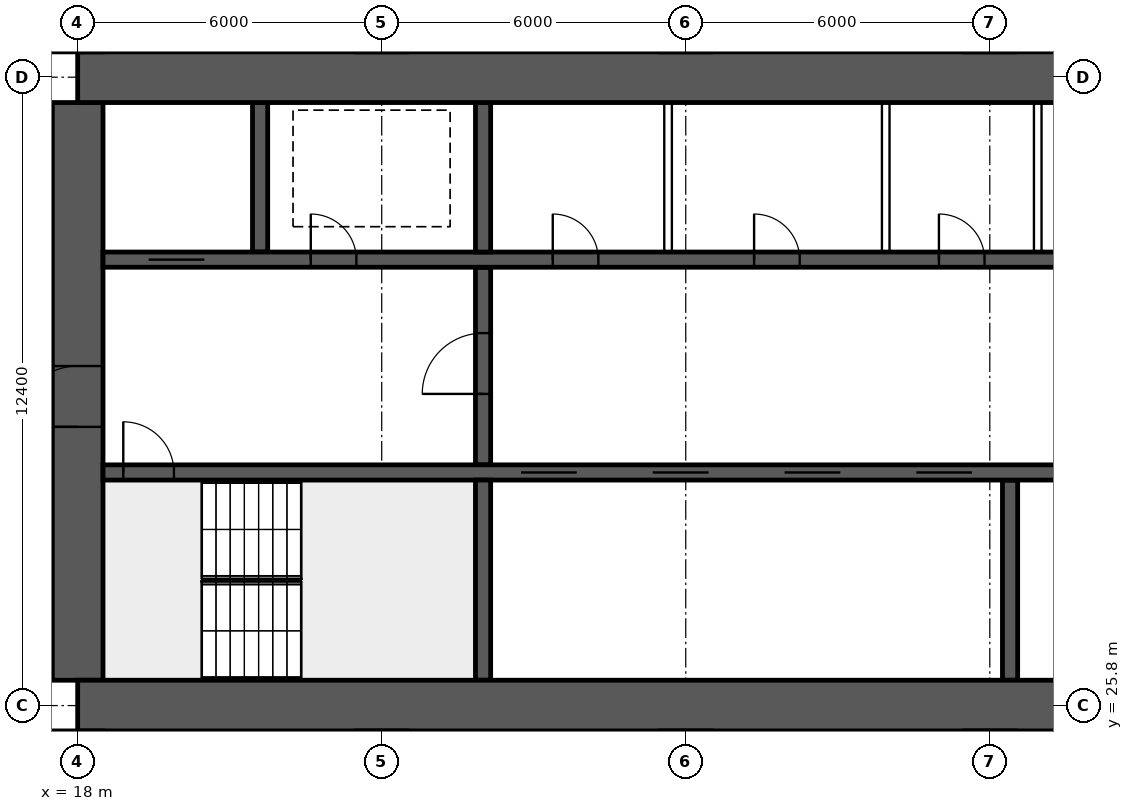
"""IFC4 building model, lengths in metres.
Left out: names, types, materials, properties, quantities, classifications, styles, units other than length and angle.
Written with IfcOpenShell. Run it as: python <this file> out.ifc"""

import sys

from ifc_helpers import new_model, si_unit, direction, frame, frame_2d, origin, place, context, subcontext, project, spatial, rectangle, extrude, element, fill, save


model = new_model("IFC4")
c1 = context("Model", 3, precision=1e-05, world=origin(), true_north=direction((0.0, 1.0)))
c2 = subcontext(c1, "Body", "Model", "MODEL_VIEW")
j1 = project(units=[si_unit("LENGTHUNIT", "METRE"), si_unit("PLANEANGLEUNIT", "RADIAN")], contexts=[c1])
p1 = place(None, origin())
s1 = spatial("IfcSite", under=j1, at=p1, CompositionType="ELEMENT")
p2 = place(p1, origin())
s2 = spatial("IfcBuilding", under=s1, at=p2, CompositionType="ELEMENT")
p3 = place(p2, frame((0.0, 0.0, 11.0)))
s3 = spatial("IfcBuildingStorey", under=s2, at=p3, CompositionType="ELEMENT", Elevation=11.0)
for number, where, z_axis, x_axis in (
    (1, (18.0, 25.8, 0.0), (0.0, 0.0, 1.0), (1.0, 0.0, 0.0)),
    (2, (18.0, 38.2, 0.0), (0.0, 0.0, 1.0), (1.0, 0.0, 0.0)),
):
    element("IfcWall", number, at=place(p3, frame(where, z_axis=z_axis, x_axis=x_axis)), inside=s3, PredefinedType="SHEAR", context=c2, shape_type="SweptSolid", body=[
        extrude(rectangle(XDim=48.0, YDim=1.0, at=frame_2d((24.0, 0.0))), origin(), (0.0, 0.0, 1.0), 5.0),
    ])
p4 = place(p3, frame((18.0, 26.3, 0.0), z_axis=(0.0, 0.0, 1.0), x_axis=(0.0, 1.0, 0.0)))
e3 = element("IfcWall", 3, at=p4, inside=s3, PredefinedType="SHEAR", context=c2, shape_type="SweptSolid", body=[
    extrude(rectangle(XDim=11.4, YDim=1.0, at=frame_2d((5.7, 0.0))), origin(), (0.0, 0.0, 1.0), 5.0),
])
p5 = place(p4, frame((5.0, 0.0, 0.0)))
e4 = element("IfcOpeningElement", 4, at=p5, cuts=e3, PredefinedType="OPENING", context=c2, shape_type="SweptSolid", body=[
    extrude(rectangle(XDim=1.2, YDim=2.1, at=frame_2d((0.6, 1.05))), frame((0.0, 0.51, 0.0), z_axis=(0.0, -1.0, 0.0), x_axis=(1.0, 0.0, 0.0)), (0.0, 0.0, 1.0), 1.02),
])
p6 = place(p3, frame((18.5, 30.4, 0.0), z_axis=(0.0, 0.0, 1.0), x_axis=(1.0, 0.0, 0.0)))
e5 = element("IfcWall", 5, at=p6, inside=s3, PredefinedType="SHEAR", context=c2, shape_type="SweptSolid", body=[
    extrude(rectangle(XDim=47.0, YDim=0.3, at=frame_2d((23.5, 0.0))), origin(), (0.0, 0.0, 1.0), 5.0),
])
p7 = place(p6, frame((0.4, 0.0, 0.0)))
e6 = element("IfcOpeningElement", 6, at=p7, cuts=e5, PredefinedType="OPENING", context=c2, shape_type="SweptSolid", body=[
    extrude(rectangle(XDim=1.0, YDim=2.1, at=frame_2d((0.5, 1.05))), frame((0.0, 0.16, 0.0), z_axis=(0.0, -1.0, 0.0), x_axis=(1.0, 0.0, 0.0)), (0.0, 0.0, 1.0), 0.32),
])
p8 = place(p6, frame((45.6, 0.0, 0.0)))
e7 = element("IfcOpeningElement", 7, at=p8, cuts=e5, PredefinedType="OPENING", context=c2, shape_type="SweptSolid", body=[
    extrude(rectangle(XDim=1.0, YDim=2.1, at=frame_2d((0.5, 1.05))), frame((0.0, 0.16, 0.0), z_axis=(0.0, -1.0, 0.0), x_axis=(1.0, 0.0, 0.0)), (0.0, 0.0, 1.0), 0.32),
])
p9 = place(p6, frame((8.25, 0.0, 0.0)))
e8 = element("IfcOpeningElement", 8, at=p9, cuts=e5, PredefinedType="OPENING", context=c2, shape_type="SweptSolid", body=[
    extrude(rectangle(XDim=1.1, YDim=2.1, at=frame_2d((0.55, 1.05))), frame((0.0, 0.16, 0.0), z_axis=(0.0, -1.0, 0.0), x_axis=(1.0, 0.0, 0.0)), (0.0, 0.0, 1.0), 0.32),
])
p10 = place(p6, frame((10.85, 0.0, 0.0)))
e9 = element("IfcOpeningElement", 9, at=p10, cuts=e5, PredefinedType="OPENING", context=c2, shape_type="SweptSolid", body=[
    extrude(rectangle(XDim=1.1, YDim=2.1, at=frame_2d((0.55, 1.05))), frame((0.0, 0.16, 0.0), z_axis=(0.0, -1.0, 0.0), x_axis=(1.0, 0.0, 0.0)), (0.0, 0.0, 1.0), 0.32),
])
p11 = place(p6, frame((13.45, 0.0, 0.0)))
e10 = element("IfcOpeningElement", 10, at=p11, cuts=e5, PredefinedType="OPENING", context=c2, shape_type="SweptSolid", body=[
    extrude(rectangle(XDim=1.1, YDim=2.1, at=frame_2d((0.55, 1.05))), frame((0.0, 0.16, 0.0), z_axis=(0.0, -1.0, 0.0), x_axis=(1.0, 0.0, 0.0)), (0.0, 0.0, 1.0), 0.32),
])
p12 = place(p6, frame((16.05, 0.0, 0.0)))
e11 = element("IfcOpeningElement", 11, at=p12, cuts=e5, PredefinedType="OPENING", context=c2, shape_type="SweptSolid", body=[
    extrude(rectangle(XDim=1.1, YDim=2.1, at=frame_2d((0.55, 1.05))), frame((0.0, 0.16, 0.0), z_axis=(0.0, -1.0, 0.0), x_axis=(1.0, 0.0, 0.0)), (0.0, 0.0, 1.0), 0.32),
])
p13 = place(p6, frame((30.117, 0.0, 0.0)))
e12 = element("IfcOpeningElement", 12, at=p13, cuts=e5, PredefinedType="OPENING", context=c2, shape_type="SweptSolid", body=[
    extrude(rectangle(XDim=1.1, YDim=2.1, at=frame_2d((0.55, 1.05))), frame((0.0, 0.16, 0.0), z_axis=(0.0, -1.0, 0.0), x_axis=(1.0, 0.0, 0.0)), (0.0, 0.0, 1.0), 0.32),
])
p14 = place(p6, frame((33.65, 0.0, 0.0)))
e13 = element("IfcOpeningElement", 13, at=p14, cuts=e5, PredefinedType="OPENING", context=c2, shape_type="SweptSolid", body=[
    extrude(rectangle(XDim=1.1, YDim=2.1, at=frame_2d((0.55, 1.05))), frame((0.0, 0.16, 0.0), z_axis=(0.0, -1.0, 0.0), x_axis=(1.0, 0.0, 0.0)), (0.0, 0.0, 1.0), 0.32),
])
p15 = place(p6, frame((37.183, 0.0, 0.0)))
e14 = element("IfcOpeningElement", 14, at=p15, cuts=e5, PredefinedType="OPENING", context=c2, shape_type="SweptSolid", body=[
    extrude(rectangle(XDim=1.1, YDim=2.1, at=frame_2d((0.55, 1.05))), frame((0.0, 0.16, 0.0), z_axis=(0.0, -1.0, 0.0), x_axis=(1.0, 0.0, 0.0)), (0.0, 0.0, 1.0), 0.32),
])
p16 = place(p3, frame((18.5, 34.6, 0.0), z_axis=(0.0, 0.0, 1.0), x_axis=(1.0, 0.0, 0.0)))
e15 = element("IfcWall", 15, at=p16, inside=s3, PredefinedType="SHEAR", context=c2, shape_type="SweptSolid", body=[
    extrude(rectangle(XDim=47.0, YDim=0.3, at=frame_2d((23.5, 0.0))), origin(), (0.0, 0.0, 1.0), 5.0),
])
p17 = place(p16, frame((0.9, 0.0, 0.0)))
e16 = element("IfcOpeningElement", 16, at=p17, cuts=e15, PredefinedType="OPENING", context=c2, shape_type="SweptSolid", body=[
    extrude(rectangle(XDim=1.1, YDim=2.1, at=frame_2d((0.55, 1.05))), frame((0.0, 0.16, 0.0), z_axis=(0.0, -1.0, 0.0), x_axis=(1.0, 0.0, 0.0)), (0.0, 0.0, 1.0), 0.32),
])
p18 = place(p16, frame((45.0, 0.0, 0.0)))
e17 = element("IfcOpeningElement", 17, at=p18, cuts=e15, PredefinedType="OPENING", context=c2, shape_type="SweptSolid", body=[
    extrude(rectangle(XDim=1.1, YDim=2.1, at=frame_2d((0.55, 1.05))), frame((0.0, 0.16, 0.0), z_axis=(0.0, -1.0, 0.0), x_axis=(1.0, 0.0, 0.0)), (0.0, 0.0, 1.0), 0.32),
])
p19 = place(p16, frame((4.1, 0.0, 0.0)))
e18 = element("IfcOpeningElement", 18, at=p19, cuts=e15, PredefinedType="OPENING", context=c2, shape_type="SweptSolid", body=[
    extrude(rectangle(XDim=0.9, YDim=2.1, at=frame_2d((0.45, 1.05))), frame((0.0, 0.16, 0.0), z_axis=(0.0, -1.0, 0.0), x_axis=(1.0, 0.0, 0.0)), (0.0, 0.0, 1.0), 0.32),
])
p20 = place(p16, frame((42.0, 0.0, 0.0)))
e19 = element("IfcOpeningElement", 19, at=p20, cuts=e15, PredefinedType="OPENING", context=c2, shape_type="SweptSolid", body=[
    extrude(rectangle(XDim=0.9, YDim=2.1, at=frame_2d((0.45, 1.05))), frame((0.0, 0.16, 0.0), z_axis=(0.0, -1.0, 0.0), x_axis=(1.0, 0.0, 0.0)), (0.0, 0.0, 1.0), 0.32),
])
p21 = place(p16, frame((8.875, 0.0, 0.0)))
e20 = element("IfcOpeningElement", 20, at=p21, cuts=e15, PredefinedType="OPENING", context=c2, shape_type="SweptSolid", body=[
    extrude(rectangle(XDim=0.9, YDim=2.1, at=frame_2d((0.45, 1.05))), frame((0.0, 0.16, 0.0), z_axis=(0.0, -1.0, 0.0), x_axis=(1.0, 0.0, 0.0)), (0.0, 0.0, 1.0), 0.32),
])
p22 = place(p16, frame((12.849, 0.0, 0.0)))
e21 = element("IfcOpeningElement", 21, at=p22, cuts=e15, PredefinedType="OPENING", context=c2, shape_type="SweptSolid", body=[
    extrude(rectangle(XDim=0.9, YDim=2.1, at=frame_2d((0.45, 1.05))), frame((0.0, 0.16, 0.0), z_axis=(0.0, -1.0, 0.0), x_axis=(1.0, 0.0, 0.0)), (0.0, 0.0, 1.0), 0.32),
])
p23 = place(p16, frame((16.496, 0.0, 0.0)))
e22 = element("IfcOpeningElement", 22, at=p23, cuts=e15, PredefinedType="OPENING", context=c2, shape_type="SweptSolid", body=[
    extrude(rectangle(XDim=0.9, YDim=2.1, at=frame_2d((0.45, 1.05))), frame((0.0, 0.16, 0.0), z_axis=(0.0, -1.0, 0.0), x_axis=(1.0, 0.0, 0.0)), (0.0, 0.0, 1.0), 0.32),
])
p24 = place(p16, frame((20.255, 0.0, 0.0)))
e23 = element("IfcOpeningElement", 23, at=p24, cuts=e15, PredefinedType="OPENING", context=c2, shape_type="SweptSolid", body=[
    extrude(rectangle(XDim=0.9, YDim=2.1, at=frame_2d((0.45, 1.05))), frame((0.0, 0.16, 0.0), z_axis=(0.0, -1.0, 0.0), x_axis=(1.0, 0.0, 0.0)), (0.0, 0.0, 1.0), 0.32),
])
p25 = place(p16, frame((24.661, 0.0, 0.0)))
e24 = element("IfcOpeningElement", 24, at=p25, cuts=e15, PredefinedType="OPENING", context=c2, shape_type="SweptSolid", body=[
    extrude(rectangle(XDim=0.9, YDim=2.1, at=frame_2d((0.45, 1.05))), frame((0.0, 0.16, 0.0), z_axis=(0.0, -1.0, 0.0), x_axis=(1.0, 0.0, 0.0)), (0.0, 0.0, 1.0), 0.32),
])
p26 = place(p16, frame((27.458, 0.0, 0.0)))
e25 = element("IfcOpeningElement", 25, at=p26, cuts=e15, PredefinedType="OPENING", context=c2, shape_type="SweptSolid", body=[
    extrude(rectangle(XDim=0.9, YDim=2.1, at=frame_2d((0.45, 1.05))), frame((0.0, 0.16, 0.0), z_axis=(0.0, -1.0, 0.0), x_axis=(1.0, 0.0, 0.0)), (0.0, 0.0, 1.0), 0.32),
])
p27 = place(p16, frame((29.831, 0.0, 0.0)))
e26 = element("IfcOpeningElement", 26, at=p27, cuts=e15, PredefinedType="OPENING", context=c2, shape_type="SweptSolid", body=[
    extrude(rectangle(XDim=0.9, YDim=2.1, at=frame_2d((0.45, 1.05))), frame((0.0, 0.16, 0.0), z_axis=(0.0, -1.0, 0.0), x_axis=(1.0, 0.0, 0.0)), (0.0, 0.0, 1.0), 0.32),
])
p28 = place(p16, frame((35.302, 0.0, 0.0)))
e27 = element("IfcOpeningElement", 27, at=p28, cuts=e15, PredefinedType="OPENING", context=c2, shape_type="SweptSolid", body=[
    extrude(rectangle(XDim=0.9, YDim=2.1, at=frame_2d((0.45, 1.05))), frame((0.0, 0.16, 0.0), z_axis=(0.0, -1.0, 0.0), x_axis=(1.0, 0.0, 0.0)), (0.0, 0.0, 1.0), 0.32),
])
p29 = place(p3, frame((26.0, 26.3, 0.0), z_axis=(0.0, 0.0, 1.0), x_axis=(0.0, 1.0, 0.0)))
e28 = element("IfcWall", 28, at=p29, inside=s3, PredefinedType="SHEAR", context=c2, shape_type="SweptSolid", body=[
    extrude(rectangle(XDim=3.95, YDim=0.3, at=frame_2d((1.975, 0.0))), origin(), (0.0, 0.0, 1.0), 5.0),
])
p30 = place(p3, frame((26.0, 30.55, 0.0), z_axis=(0.0, 0.0, 1.0), x_axis=(0.0, 1.0, 0.0)))
e29 = element("IfcWall", 29, at=p30, inside=s3, PredefinedType="SHEAR", context=c2, shape_type="SweptSolid", body=[
    extrude(rectangle(XDim=3.9, YDim=0.3, at=frame_2d((1.95, 0.0))), origin(), (0.0, 0.0, 1.0), 5.0),
])
p31 = place(p30, frame((1.4, 0.0, 0.0)))
e30 = element("IfcOpeningElement", 30, at=p31, cuts=e29, PredefinedType="OPENING", context=c2, shape_type="SweptSolid", body=[
    extrude(rectangle(XDim=1.2, YDim=2.1, at=frame_2d((0.6, 1.05))), frame((0.0, 0.16, 0.0), z_axis=(0.0, -1.0, 0.0), x_axis=(1.0, 0.0, 0.0)), (0.0, 0.0, 1.0), 0.32),
])
for number, where, z_axis, x_axis in (
    (31, (21.6, 34.75, 0.0), (0.0, 0.0, 1.0), (0.0, 1.0, 0.0)),
    (32, (26.0, 34.75, 0.0), (0.0, 0.0, 1.0), (0.0, 1.0, 0.0)),
):
    element("IfcWall", number, at=place(p3, frame(where, z_axis=z_axis, x_axis=x_axis)), inside=s3, PredefinedType="SHEAR", context=c2, shape_type="SweptSolid", body=[
        extrude(rectangle(XDim=2.95, YDim=0.3, at=frame_2d((1.475, 0.0))), origin(), (0.0, 0.0, 1.0), 5.0),
    ])
p32 = place(p3, frame((36.4, 26.3, 0.0), z_axis=(0.0, 0.0, 1.0), x_axis=(0.0, 1.0, 0.0)))
e33 = element("IfcWall", 33, at=p32, inside=s3, PredefinedType="SHEAR", context=c2, shape_type="SweptSolid", body=[
    extrude(rectangle(XDim=3.95, YDim=0.3, at=frame_2d((1.975, 0.0))), origin(), (0.0, 0.0, 1.0), 5.0),
])
for number, where, z_axis, x_axis in (
    (34, (29.651, 34.75, 0.0), (0.0, 0.0, 1.0), (0.0, 1.0, 0.0)),
    (35, (33.946, 34.75, 0.0), (0.0, 0.0, 1.0), (0.0, 1.0, 0.0)),
    (36, (36.946, 34.75, 0.0), (0.0, 0.0, 1.0), (0.0, 1.0, 0.0)),
):
    element("IfcWall", number, at=place(p3, frame(where, z_axis=z_axis, x_axis=x_axis)), inside=s3, PredefinedType="SOLIDWALL", context=c2, shape_type="SweptSolid", body=[
        extrude(rectangle(XDim=2.95, YDim=0.15, at=frame_2d((1.475, 0.0))), origin(), (0.0, 0.0, 1.0), 4.6),
    ])
p33 = place(p3, frame((21.75, 38.5, 0.0), z_axis=(0.0, 0.0, 1.0), x_axis=(0.0, 1.0, 0.0)))
e37 = element("IfcWall", 37, at=p33, inside=s3, PredefinedType="PARTITIONING", context=c2, shape_type="SweptSolid", body=[
    extrude(rectangle(XDim=10.7, YDim=0.15, at=frame_2d((5.35, 0.0))), origin(), (0.0, 0.0, 1.0), 4.6),
])
p34 = place(p33, frame((8.8, 0.0, 0.0)))
e38 = element("IfcOpeningElement", 38, at=p34, cuts=e37, PredefinedType="OPENING", context=c2, shape_type="SweptSolid", body=[
    extrude(rectangle(XDim=0.9, YDim=2.1, at=frame_2d((0.45, 1.05))), frame((0.0, 0.085, 0.0), z_axis=(0.0, -1.0, 0.0), x_axis=(1.0, 0.0, 0.0)), (0.0, 0.0, 1.0), 0.17),
])
p35 = place(p3, frame((26.325, 38.5, 0.0), z_axis=(0.0, 0.0, 1.0), x_axis=(0.0, 1.0, 0.0)))
e39 = element("IfcWall", 39, at=p35, inside=s3, PredefinedType="PARTITIONING", context=c2, shape_type="SweptSolid", body=[
    extrude(rectangle(XDim=10.7, YDim=0.15, at=frame_2d((5.35, 0.0))), origin(), (0.0, 0.0, 1.0), 4.6),
])
p36 = place(p35, frame((8.8, 0.0, 0.0)))
e40 = element("IfcOpeningElement", 40, at=p36, cuts=e39, PredefinedType="OPENING", context=c2, shape_type="SweptSolid", body=[
    extrude(rectangle(XDim=0.9, YDim=2.1, at=frame_2d((0.45, 1.05))), frame((0.0, 0.085, 0.0), z_axis=(0.0, -1.0, 0.0), x_axis=(1.0, 0.0, 0.0)), (0.0, 0.0, 1.0), 0.17),
])
p37 = place(p3, frame((33.45, 38.5, 0.0), z_axis=(0.0, 0.0, 1.0), x_axis=(0.0, 1.0, 0.0)))
e41 = element("IfcWall", 41, at=p37, inside=s3, PredefinedType="PARTITIONING", context=c2, shape_type="SweptSolid", body=[
    extrude(rectangle(XDim=10.7, YDim=0.15, at=frame_2d((5.35, 0.0))), origin(), (0.0, 0.0, 1.0), 4.6),
])
p38 = place(p37, frame((8.8, 0.0, 0.0)))
e42 = element("IfcOpeningElement", 42, at=p38, cuts=e41, PredefinedType="OPENING", context=c2, shape_type="SweptSolid", body=[
    extrude(rectangle(XDim=0.9, YDim=2.1, at=frame_2d((0.45, 1.05))), frame((0.0, 0.085, 0.0), z_axis=(0.0, -1.0, 0.0), x_axis=(1.0, 0.0, 0.0)), (0.0, 0.0, 1.0), 0.17),
])
p39 = place(p5, origin())
e43 = element("IfcDoor", 43, at=p39, inside=s3, OperationType="SINGLE_SWING_LEFT", PredefinedType="DOOR", context=c2, shape_type="SweptSolid", body=[
    extrude(rectangle(XDim=1.2, YDim=2.1, at=frame_2d((0.6, 1.05))), frame((0.0, 0.025, 0.0), z_axis=(0.0, -1.0, 0.0), x_axis=(1.0, 0.0, 0.0)), (0.0, 0.0, 1.0), 0.05),
])
fill(e4, e43)
p40 = place(p7, origin())
e44 = element("IfcDoor", 44, at=p40, inside=s3, OperationType="SINGLE_SWING_LEFT", PredefinedType="DOOR", context=c2, shape_type="SweptSolid", body=[
    extrude(rectangle(XDim=1.0, YDim=2.1, at=frame_2d((0.5, 1.05))), frame((0.0, 0.025, 0.0), z_axis=(0.0, -1.0, 0.0), x_axis=(1.0, 0.0, 0.0)), (0.0, 0.0, 1.0), 0.05),
])
fill(e6, e44)
p41 = place(p17, origin())
e45 = element("IfcDoor", 45, at=p41, inside=s3, OperationType="DOUBLE_DOOR_SLIDING", PredefinedType="DOOR", context=c2, shape_type="SweptSolid", body=[
    extrude(rectangle(XDim=1.1, YDim=2.1, at=frame_2d((0.55, 1.05))), frame((0.0, 0.025, 0.0), z_axis=(0.0, -1.0, 0.0), x_axis=(1.0, 0.0, 0.0)), (0.0, 0.0, 1.0), 0.05),
])
fill(e16, e45)
p42 = place(p19, origin())
e46 = element("IfcDoor", 46, at=p42, inside=s3, OperationType="SINGLE_SWING_LEFT", PredefinedType="DOOR", context=c2, shape_type="SweptSolid", body=[
    extrude(rectangle(XDim=0.9, YDim=2.1, at=frame_2d((0.45, 1.05))), frame((0.0, 0.025, 0.0), z_axis=(0.0, -1.0, 0.0), x_axis=(1.0, 0.0, 0.0)), (0.0, 0.0, 1.0), 0.05),
])
fill(e18, e46)
p43 = place(p31, origin())
e47 = element("IfcDoor", 47, at=p43, inside=s3, OperationType="SINGLE_SWING_LEFT", PredefinedType="DOOR", context=c2, shape_type="SweptSolid", body=[
    extrude(rectangle(XDim=1.2, YDim=2.1, at=frame_2d((0.6, 1.05))), frame((0.0, 0.025, 0.0), z_axis=(0.0, -1.0, 0.0), x_axis=(1.0, 0.0, 0.0)), (0.0, 0.0, 1.0), 0.05),
])
fill(e30, e47)
p44 = place(p21, origin())
e48 = element("IfcDoor", 48, at=p44, inside=s3, OperationType="SINGLE_SWING_LEFT", PredefinedType="DOOR", context=c2, shape_type="SweptSolid", body=[
    extrude(rectangle(XDim=0.9, YDim=2.1, at=frame_2d((0.45, 1.05))), frame((0.0, 0.025, 0.0), z_axis=(0.0, -1.0, 0.0), x_axis=(1.0, 0.0, 0.0)), (0.0, 0.0, 1.0), 0.05),
])
fill(e20, e48)
p45 = place(p22, origin())
e49 = element("IfcDoor", 49, at=p45, inside=s3, OperationType="SINGLE_SWING_LEFT", PredefinedType="DOOR", context=c2, shape_type="SweptSolid", body=[
    extrude(rectangle(XDim=0.9, YDim=2.1, at=frame_2d((0.45, 1.05))), frame((0.0, 0.025, 0.0), z_axis=(0.0, -1.0, 0.0), x_axis=(1.0, 0.0, 0.0)), (0.0, 0.0, 1.0), 0.05),
])
fill(e21, e49)
p46 = place(p23, origin())
e50 = element("IfcDoor", 50, at=p46, inside=s3, OperationType="SINGLE_SWING_LEFT", PredefinedType="DOOR", context=c2, shape_type="SweptSolid", body=[
    extrude(rectangle(XDim=0.9, YDim=2.1, at=frame_2d((0.45, 1.05))), frame((0.0, 0.025, 0.0), z_axis=(0.0, -1.0, 0.0), x_axis=(1.0, 0.0, 0.0)), (0.0, 0.0, 1.0), 0.05),
])
fill(e22, e50)
p47 = place(p9, origin())
e51 = element("IfcDoor", 51, at=p47, inside=s3, OperationType="DOUBLE_DOOR_SLIDING", PredefinedType="DOOR", context=c2, shape_type="SweptSolid", body=[
    extrude(rectangle(XDim=1.1, YDim=2.1, at=frame_2d((0.55, 1.05))), frame((0.0, 0.025, 0.0), z_axis=(0.0, -1.0, 0.0), x_axis=(1.0, 0.0, 0.0)), (0.0, 0.0, 1.0), 0.05),
])
fill(e8, e51)
p48 = place(p10, origin())
e52 = element("IfcDoor", 52, at=p48, inside=s3, OperationType="DOUBLE_DOOR_SLIDING", PredefinedType="DOOR", context=c2, shape_type="SweptSolid", body=[
    extrude(rectangle(XDim=1.1, YDim=2.1, at=frame_2d((0.55, 1.05))), frame((0.0, 0.025, 0.0), z_axis=(0.0, -1.0, 0.0), x_axis=(1.0, 0.0, 0.0)), (0.0, 0.0, 1.0), 0.05),
])
fill(e9, e52)
p49 = place(p11, origin())
e53 = element("IfcDoor", 53, at=p49, inside=s3, OperationType="DOUBLE_DOOR_SLIDING", PredefinedType="DOOR", context=c2, shape_type="SweptSolid", body=[
    extrude(rectangle(XDim=1.1, YDim=2.1, at=frame_2d((0.55, 1.05))), frame((0.0, 0.025, 0.0), z_axis=(0.0, -1.0, 0.0), x_axis=(1.0, 0.0, 0.0)), (0.0, 0.0, 1.0), 0.05),
])
fill(e10, e53)
p50 = place(p12, origin())
e54 = element("IfcDoor", 54, at=p50, inside=s3, OperationType="DOUBLE_DOOR_SLIDING", PredefinedType="DOOR", context=c2, shape_type="SweptSolid", body=[
    extrude(rectangle(XDim=1.1, YDim=2.1, at=frame_2d((0.55, 1.05))), frame((0.0, 0.025, 0.0), z_axis=(0.0, -1.0, 0.0), x_axis=(1.0, 0.0, 0.0)), (0.0, 0.0, 1.0), 0.05),
])
fill(e11, e54)
save(model, sys.argv[1])
